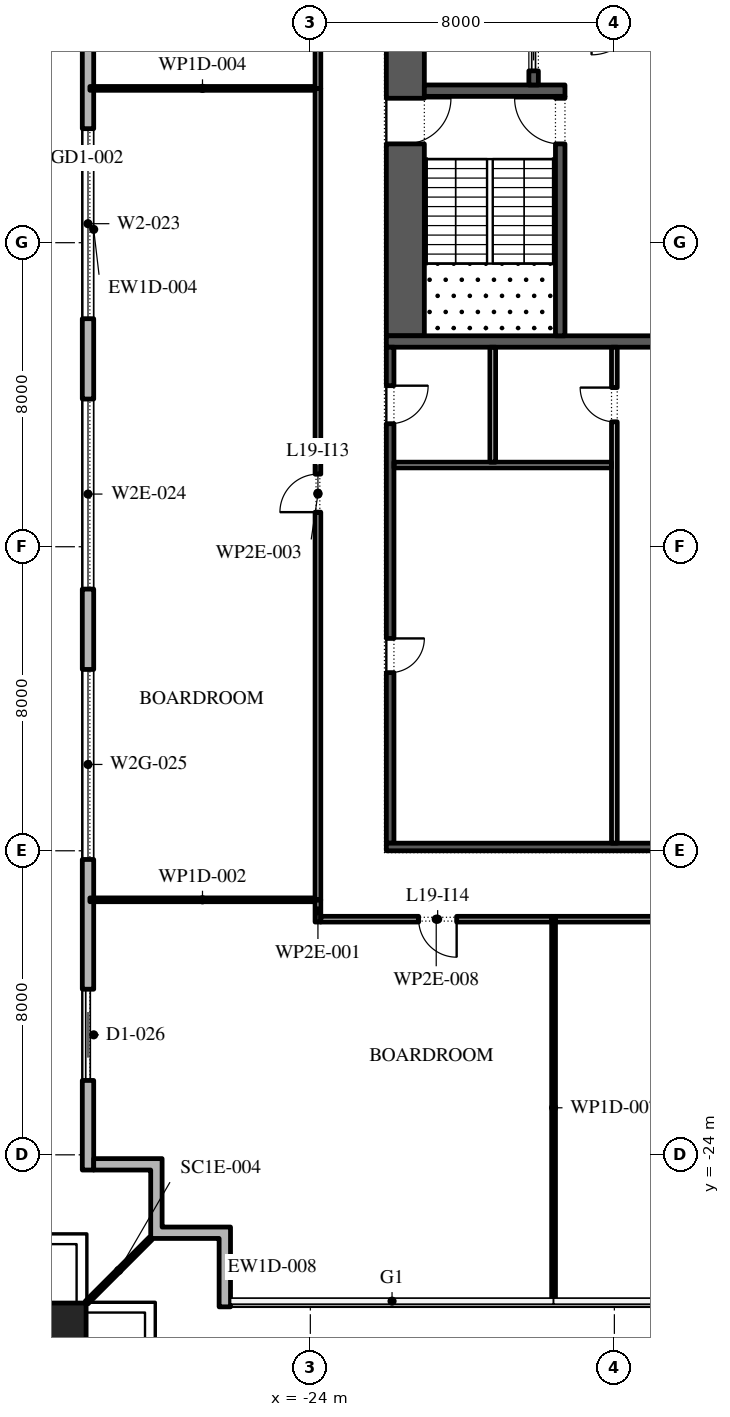
"""IFC4 building model, lengths in metres.
Left out: names, types, materials, properties, quantities, classifications, styles, units other than length and angle.
Written with IfcOpenShell. Run it as: python <this file> out.ifc"""

import sys

from ifc_helpers import new_model, si_unit, direction, frame, frame_2d, origin, origin_2d, place, context, subcontext, project, spatial, polyline, rectangle, outline, extrude, element, fill, save


model = new_model("IFC4")
c1 = context("Model", 3, precision=1e-05, world=origin(), true_north=direction((0.0, 1.0)))
c2 = subcontext(c1, "Body", "Model", "MODEL_VIEW")
j1 = project(units=[si_unit("LENGTHUNIT", "METRE"), si_unit("PLANEANGLEUNIT", "RADIAN")], contexts=[c1])
p1 = place(None, origin())
s1 = spatial("IfcSite", under=j1, at=p1, CompositionType="ELEMENT")
p2 = place(p1, origin())
s2 = spatial("IfcBuilding", under=s1, at=p2, CompositionType="ELEMENT")
p3 = place(p2, frame((0.0, 0.0, 90.0)))
s3 = spatial("IfcBuildingStorey", under=s2, at=p3, CompositionType="ELEMENT", Elevation=90.0)
p4 = place(p3, frame((-30.6, -28.6, 0.0), z_axis=(0.0, 0.0, 1.0), x_axis=(1.0, 0.0, 0.0)))
e1 = element("IfcColumn", 1, at=p4, inside=s3, PredefinedType="COLUMN", context=c2, shape_type="SweptSolid", body=[
    extrude(rectangle(XDim=1.4, YDim=1.4, at=origin_2d()), origin(), (0.0, 0.0, 1.0), 4.2),
])
p5 = place(p3, frame((-29.85, 25.1, 0.0), z_axis=(0.0, 0.0, 1.0), x_axis=(0.0, -1.0, 0.0)))
e2 = element("IfcWall", 2, at=p5, inside=s3, PredefinedType="STANDARD", context=c2, shape_type="SweptSolid", body=[
    extrude(rectangle(XDim=49.5, YDim=0.3, at=frame_2d((24.75, 0.0))), origin(), (0.0, 0.0, 1.0), 3.9),
])
p6 = place(p5, frame((0.907, 0.0, 0.45)))
e3 = element("IfcOpeningElement", 3, at=p6, cuts=e2, PredefinedType="OPENING", context=c2, shape_type="SweptSolid", body=[
    extrude(rectangle(XDim=5.0, YDim=2.775, at=frame_2d((2.5, 1.387))), frame((0.0, 0.16, 0.0), z_axis=(0.0, -1.0, 0.0), x_axis=(1.0, 0.0, 0.0)), (0.0, 0.0, 1.0), 0.32),
])
p7 = place(p5, frame((7.871, 0.0, 0.45)))
e4 = element("IfcOpeningElement", 4, at=p7, cuts=e2, PredefinedType="OPENING", context=c2, shape_type="SweptSolid", body=[
    extrude(rectangle(XDim=5.0, YDim=3.25, at=frame_2d((2.5, 1.625))), frame((0.0, 0.16, 0.0), z_axis=(0.0, -1.0, 0.0), x_axis=(1.0, 0.0, 0.0)), (0.0, 0.0, 1.0), 0.32),
])
p8 = place(p5, frame((16.286, 0.0, 0.0)))
e5 = element("IfcOpeningElement", 5, at=p8, cuts=e2, PredefinedType="OPENING", context=c2, shape_type="SweptSolid", body=[
    extrude(rectangle(XDim=2.4, YDim=3.5, at=frame_2d((1.2, 1.75))), frame((0.0, 0.16, 0.0), z_axis=(0.0, -1.0, 0.0), x_axis=(1.0, 0.0, 0.0)), (0.0, 0.0, 1.0), 0.32),
])
p9 = place(p5, frame((22.1, 0.0, 0.45)))
e6 = element("IfcOpeningElement", 6, at=p9, cuts=e2, PredefinedType="OPENING", context=c2, shape_type="SweptSolid", body=[
    extrude(rectangle(XDim=5.0, YDim=3.25, at=frame_2d((2.5, 1.625))), frame((0.0, 0.16, 0.0), z_axis=(0.0, -1.0, 0.0), x_axis=(1.0, 0.0, 0.0)), (0.0, 0.0, 1.0), 0.32),
])
p10 = place(p5, frame((29.214, 0.0, 0.45)))
e7 = element("IfcOpeningElement", 7, at=p10, cuts=e2, PredefinedType="OPENING", context=c2, shape_type="SweptSolid", body=[
    extrude(rectangle(XDim=5.0, YDim=2.775, at=frame_2d((2.5, 1.387))), frame((0.0, 0.16, 0.0), z_axis=(0.0, -1.0, 0.0), x_axis=(1.0, 0.0, 0.0)), (0.0, 0.0, 1.0), 0.32),
])
p11 = place(p5, frame((36.329, 0.0, 0.45)))
e8 = element("IfcOpeningElement", 8, at=p11, cuts=e2, PredefinedType="OPENING", context=c2, shape_type="SweptSolid", body=[
    extrude(rectangle(XDim=5.0, YDim=2.725, at=frame_2d((2.5, 1.363))), frame((0.0, 0.16, 0.0), z_axis=(0.0, -1.0, 0.0), x_axis=(1.0, 0.0, 0.0)), (0.0, 0.0, 1.0), 0.32),
])
p12 = place(p5, frame((44.743, 0.0, 0.0)))
e9 = element("IfcOpeningElement", 9, at=p12, cuts=e2, PredefinedType="OPENING", context=c2, shape_type="SweptSolid", body=[
    extrude(rectangle(XDim=2.4, YDim=3.5, at=frame_2d((1.2, 1.75))), frame((0.0, 0.16, 0.0), z_axis=(0.0, -1.0, 0.0), x_axis=(1.0, 0.0, 0.0)), (0.0, 0.0, 1.0), 0.32),
])
p13 = place(p3, origin())
e10 = element("IfcWall", 10, at=p13, inside=s3, PredefinedType="STANDARD", context=c2, shape_type="SweptSolid", body=[
    extrude(outline(polyline([(-26.4, -26.2), (-28.2, -26.2), (-28.2, -24.4), (-29.7, -24.4), (-29.7, -24.1), (-27.9, -24.1), (-27.9, -25.9), (-26.1, -25.9), (-26.1, -28.0), (-26.4, -28.0), (-26.4, -26.2)])), origin(), (0.0, 0.0, 1.0), 3.9),
])
p14 = place(p3, frame((-28.2, -26.2, -0.05), z_axis=(0.0, 0.0, 1.0), x_axis=(-0.707106781187, -0.707106781187, 0.0)))
e11 = element("IfcWall", 11, at=p14, inside=s3, PredefinedType="STANDARD", context=c2, shape_type="SweptSolid", body=[
    extrude(rectangle(XDim=2.385, YDim=0.1, at=frame_2d((1.192, 0.0))), origin(), (0.0, 0.0, 1.0), 3.95),
])
p15 = place(p3, frame((-21.5, -2.45, 0.0), z_axis=(0.0, 0.0, 1.0), x_axis=(0.0, 1.0, 0.0)))
e12 = element("IfcWall", 12, at=p15, inside=s3, PredefinedType="SHEAR", context=c2, shape_type="SweptSolid", body=[
    extrude(rectangle(XDim=27.9, YDim=1.0, at=frame_2d((13.95, 0.0))), origin(), (0.0, 0.0, 1.0), 3.9),
])
p16 = place(p15, frame((5.05, 0.0, 0.0)))
e13 = element("IfcOpeningElement", 13, at=p16, cuts=e12, PredefinedType="OPENING", context=c2, shape_type="SweptSolid", body=[
    extrude(rectangle(XDim=1.2, YDim=2.1, at=frame_2d((0.6, 1.05))), frame((0.0, 0.51, 0.0), z_axis=(0.0, -1.0, 0.0), x_axis=(1.0, 0.0, 0.0)), (0.0, 0.0, 1.0), 1.02),
])
p17 = place(p15, frame((21.65, 0.0, 0.0)))
e14 = element("IfcOpeningElement", 14, at=p17, cuts=e12, PredefinedType="OPENING", context=c2, shape_type="SweptSolid", body=[
    extrude(rectangle(XDim=1.2, YDim=2.1, at=frame_2d((0.6, 1.05))), frame((0.0, 0.51, 0.0), z_axis=(0.0, -1.0, 0.0), x_axis=(1.0, 0.0, 0.0)), (0.0, 0.0, 1.0), 1.02),
])
p18 = place(p3, frame((-22.0, -2.6, 0.0), z_axis=(0.0, 0.0, 1.0), x_axis=(1.0, 0.0, 0.0)))
e15 = element("IfcWall", 15, at=p18, inside=s3, PredefinedType="SHEAR", context=c2, shape_type="SweptSolid", body=[
    extrude(rectangle(XDim=12.0, YDim=0.3, at=frame_2d((6.0, 0.0))), origin(), (0.0, 0.0, 1.0), 3.9),
])
p19 = place(p3, frame((-21.0, 4.0, 0.0), z_axis=(0.0, 0.0, 1.0), x_axis=(1.0, 0.0, 0.0)))
e16 = element("IfcWall", 16, at=p19, inside=s3, PredefinedType="SHEAR", context=c2, shape_type="SweptSolid", body=[
    extrude(rectangle(XDim=3.7, YDim=0.3, at=frame_2d((1.85, 0.0))), origin(), (0.0, 0.0, 1.0), 3.9),
])
p20 = place(p3, frame((-17.425, -2.45, 0.0), z_axis=(0.0, 0.0, 1.0), x_axis=(0.0, 1.0, 0.0)))
e17 = element("IfcWall", 17, at=p20, inside=s3, PredefinedType="SHEAR", context=c2, shape_type="SweptSolid", body=[
    extrude(rectangle(XDim=6.3, YDim=0.25, at=frame_2d((3.15, 0.0))), origin(), (0.0, 0.0, 1.0), 3.9),
])
p21 = place(p20, frame((5.05, 0.0, 0.0)))
e18 = element("IfcOpeningElement", 18, at=p21, cuts=e17, PredefinedType="OPENING", context=c2, shape_type="SweptSolid", body=[
    extrude(rectangle(XDim=1.2, YDim=2.1, at=frame_2d((0.6, 1.05))), frame((0.0, 0.135, 0.0), z_axis=(0.0, -1.0, 0.0), x_axis=(1.0, 0.0, 0.0)), (0.0, 0.0, 1.0), 0.27),
])
p22 = place(p3, frame((-18.125, 4.15, 0.0), z_axis=(0.0, 0.0, 1.0), x_axis=(0.0, 1.0, 0.0)))
e19 = element("IfcWall", 19, at=p22, inside=s3, PredefinedType="SHEAR", context=c2, shape_type="SweptSolid", body=[
    extrude(rectangle(XDim=14.7, YDim=0.25, at=frame_2d((7.35, 0.0))), origin(), (0.0, 0.0, 1.0), 3.9),
])
p23 = place(p22, frame((0.371, 0.0, 0.0)))
e20 = element("IfcOpeningElement", 20, at=p23, cuts=e19, PredefinedType="OPENING", context=c2, shape_type="SweptSolid", body=[
    extrude(rectangle(XDim=1.1, YDim=2.1, at=frame_2d((0.55, 1.05))), frame((0.0, 0.135, 0.0), z_axis=(0.0, -1.0, 0.0), x_axis=(1.0, 0.0, 0.0)), (0.0, 0.0, 1.0), 0.27),
])
p24 = place(p22, frame((2.514, 0.0, 0.0)))
e21 = element("IfcOpeningElement", 21, at=p24, cuts=e19, PredefinedType="OPENING", context=c2, shape_type="SweptSolid", body=[
    extrude(rectangle(XDim=1.1, YDim=2.1, at=frame_2d((0.55, 1.05))), frame((0.0, 0.135, 0.0), z_axis=(0.0, -1.0, 0.0), x_axis=(1.0, 0.0, 0.0)), (0.0, 0.0, 1.0), 0.27),
])
p25 = place(p22, frame((4.657, 0.0, 0.0)))
e22 = element("IfcOpeningElement", 22, at=p25, cuts=e19, PredefinedType="OPENING", context=c2, shape_type="SweptSolid", body=[
    extrude(rectangle(XDim=1.1, YDim=2.1, at=frame_2d((0.55, 1.05))), frame((0.0, 0.135, 0.0), z_axis=(0.0, -1.0, 0.0), x_axis=(1.0, 0.0, 0.0)), (0.0, 0.0, 1.0), 0.27),
])
p26 = place(p22, frame((6.8, 0.0, 0.0)))
e23 = element("IfcOpeningElement", 23, at=p26, cuts=e19, PredefinedType="OPENING", context=c2, shape_type="SweptSolid", body=[
    extrude(rectangle(XDim=1.1, YDim=2.1, at=frame_2d((0.55, 1.05))), frame((0.0, 0.135, 0.0), z_axis=(0.0, -1.0, 0.0), x_axis=(1.0, 0.0, 0.0)), (0.0, 0.0, 1.0), 0.27),
])
p27 = place(p22, frame((8.943, 0.0, 0.0)))
e24 = element("IfcOpeningElement", 24, at=p27, cuts=e19, PredefinedType="OPENING", context=c2, shape_type="SweptSolid", body=[
    extrude(rectangle(XDim=1.1, YDim=2.1, at=frame_2d((0.55, 1.05))), frame((0.0, 0.135, 0.0), z_axis=(0.0, -1.0, 0.0), x_axis=(1.0, 0.0, 0.0)), (0.0, 0.0, 1.0), 0.27),
])
p28 = place(p22, frame((11.086, 0.0, 0.0)))
e25 = element("IfcOpeningElement", 25, at=p28, cuts=e19, PredefinedType="OPENING", context=c2, shape_type="SweptSolid", body=[
    extrude(rectangle(XDim=1.1, YDim=2.1, at=frame_2d((0.55, 1.05))), frame((0.0, 0.135, 0.0), z_axis=(0.0, -1.0, 0.0), x_axis=(1.0, 0.0, 0.0)), (0.0, 0.0, 1.0), 0.27),
])
p29 = place(p22, frame((13.229, 0.0, 0.0)))
e26 = element("IfcOpeningElement", 26, at=p29, cuts=e19, PredefinedType="OPENING", context=c2, shape_type="SweptSolid", body=[
    extrude(rectangle(XDim=1.1, YDim=2.1, at=frame_2d((0.55, 1.05))), frame((0.0, 0.135, 0.0), z_axis=(0.0, -1.0, 0.0), x_axis=(1.0, 0.0, 0.0)), (0.0, 0.0, 1.0), 0.27),
])
p30 = place(p3, frame((-21.9, -15.8, 0.0), z_axis=(0.0, 0.0, 1.0), x_axis=(0.0, 1.0, 0.0)))
e27 = element("IfcWall", 27, at=p30, inside=s3, PredefinedType="SHEAR", context=c2, shape_type="SweptSolid", body=[
    extrude(rectangle(XDim=13.05, YDim=0.2, at=frame_2d((6.525, 0.0))), origin(), (0.0, 0.0, 1.0), 3.9),
])
p31 = place(p30, frame((4.488, 0.0, 0.0)))
e28 = element("IfcOpeningElement", 28, at=p31, cuts=e27, PredefinedType="OPENING", context=c2, shape_type="SweptSolid", body=[
    extrude(rectangle(XDim=0.9, YDim=2.1, at=frame_2d((0.45, 1.05))), frame((0.0, 0.11, 0.0), z_axis=(0.0, -1.0, 0.0), x_axis=(1.0, 0.0, 0.0)), (0.0, 0.0, 1.0), 0.22),
])
p32 = place(p30, frame((11.038, 0.0, 0.0)))
e29 = element("IfcOpeningElement", 29, at=p32, cuts=e27, PredefinedType="OPENING", context=c2, shape_type="SweptSolid", body=[
    extrude(rectangle(XDim=1.0, YDim=2.1, at=frame_2d((0.5, 1.05))), frame((0.0, 0.11, 0.0), z_axis=(0.0, -1.0, 0.0), x_axis=(1.0, 0.0, 0.0)), (0.0, 0.0, 1.0), 0.22),
])
p33 = place(p3, frame((-22.0, -15.9, 0.0), z_axis=(0.0, 0.0, 1.0), x_axis=(1.0, 0.0, 0.0)))
e30 = element("IfcWall", 30, at=p33, inside=s3, PredefinedType="SHEAR", context=c2, shape_type="SweptSolid", body=[
    extrude(rectangle(XDim=12.0, YDim=0.2, at=frame_2d((6.0, 0.0))), origin(), (0.0, 0.0, 1.0), 3.9),
])
p34 = place(p3, frame((-16.0, -15.8, 0.0), z_axis=(0.0, 0.0, 1.0), x_axis=(0.0, 1.0, 0.0)))
e31 = element("IfcWall", 31, at=p34, inside=s3, PredefinedType="PARTITIONING", context=c2, shape_type="SweptSolid", body=[
    extrude(rectangle(XDim=13.05, YDim=0.15, at=frame_2d((6.525, 0.0))), origin(), (0.0, 0.0, 1.0), 3.9),
])
p35 = place(p34, frame((11.087, 0.0, 0.0)))
e32 = element("IfcOpeningElement", 32, at=p35, cuts=e31, PredefinedType="OPENING", context=c2, shape_type="SweptSolid", body=[
    extrude(rectangle(XDim=0.9, YDim=2.1, at=frame_2d((0.45, 1.05))), frame((0.0, 0.085, 0.0), z_axis=(0.0, -1.0, 0.0), x_axis=(1.0, 0.0, 0.0)), (0.0, 0.0, 1.0), 0.17),
])
p36 = place(p3, frame((-21.8, -5.85, 0.0), z_axis=(0.0, 0.0, 1.0), x_axis=(1.0, 0.0, 0.0)))
e33 = element("IfcWall", 33, at=p36, inside=s3, PredefinedType="PARTITIONING", context=c2, shape_type="SweptSolid", body=[
    extrude(rectangle(XDim=5.725, YDim=0.15, at=frame_2d((2.863, 0.0))), origin(), (0.0, 0.0, 1.0), 3.9),
])
p37 = place(p3, frame((-19.2, -5.775, 0.0), z_axis=(0.0, 0.0, 1.0), x_axis=(0.0, 1.0, 0.0)))
e34 = element("IfcWall", 34, at=p37, inside=s3, PredefinedType="PARTITIONING", context=c2, shape_type="SweptSolid", body=[
    extrude(rectangle(XDim=3.025, YDim=0.15, at=frame_2d((1.512, 0.0))), origin(), (0.0, 0.0, 1.0), 3.9),
])
p38 = place(p3, frame((-23.8, -17.875, 0.0), z_axis=(0.0, 0.0, 1.0), x_axis=(0.0, 1.0, 0.0)))
e35 = element("IfcWall", 35, at=p38, inside=s3, PredefinedType="PARTITIONING", context=c2, shape_type="SweptSolid", body=[
    extrude(rectangle(XDim=0.585, YDim=0.15, at=frame_2d((0.292, 0.0))), origin(), (0.0, 0.0, 1.0), 3.9),
])
p39 = place(p3, frame((-23.875, -17.29, 0.0), z_axis=(0.0, 0.0, 1.0), x_axis=(-1.0, 0.0, 0.0)))
e36 = element("IfcWall", 36, at=p39, inside=s3, PredefinedType="PARTITIONING", context=c2, shape_type="SweptSolid", body=[
    extrude(rectangle(XDim=5.925, YDim=0.1, at=frame_2d((2.962, 0.0))), origin(), (0.0, 0.0, 1.0), 3.9),
])
p40 = place(p3, frame((-23.8, -17.29, 0.0), z_axis=(0.0, 0.0, 1.0), x_axis=(0.0, 1.0, 0.0)))
e37 = element("IfcWall", 37, at=p40, inside=s3, PredefinedType="PARTITIONING", context=c2, shape_type="SweptSolid", body=[
    extrude(rectangle(XDim=21.35, YDim=0.15, at=frame_2d((10.675, 0.0))), origin(), (0.0, 0.0, 1.0), 3.9),
])
p41 = place(p40, frame((10.2, 0.0, 0.0)))
e38 = element("IfcOpeningElement", 38, at=p41, cuts=e37, PredefinedType="OPENING", context=c2, shape_type="SweptSolid", body=[
    extrude(rectangle(XDim=1.0, YDim=2.1, at=frame_2d((0.5, 1.05))), frame((0.0, 0.085, 0.0), z_axis=(0.0, -1.0, 0.0), x_axis=(1.0, 0.0, 0.0)), (0.0, 0.0, 1.0), 0.17),
])
p42 = place(p3, frame((-23.875, 4.06, 0.0), z_axis=(0.0, 0.0, 1.0), x_axis=(-1.0, 0.0, 0.0)))
e39 = element("IfcWall", 39, at=p42, inside=s3, PredefinedType="PARTITIONING", context=c2, shape_type="SweptSolid", body=[
    extrude(rectangle(XDim=5.925, YDim=0.1, at=frame_2d((2.962, 0.0))), origin(), (0.0, 0.0, 1.0), 3.9),
])
p43 = place(p3, frame((-23.8, 4.06, 0.0), z_axis=(0.0, 0.0, 1.0), x_axis=(0.0, 1.0, 0.0)))
e40 = element("IfcWall", 40, at=p43, inside=s3, PredefinedType="PARTITIONING", context=c2, shape_type="SweptSolid", body=[
    extrude(rectangle(XDim=23.14, YDim=0.15, at=frame_2d((11.57, 0.0))), origin(), (0.0, 0.0, 1.0), 3.9),
])
p44 = place(p43, frame((10.99, 0.0, 0.0)))
e41 = element("IfcOpeningElement", 41, at=p44, cuts=e40, PredefinedType="OPENING", context=c2, shape_type="SweptSolid", body=[
    extrude(rectangle(XDim=1.0, YDim=2.1, at=frame_2d((0.5, 1.05))), frame((0.0, 0.085, 0.0), z_axis=(0.0, -1.0, 0.0), x_axis=(1.0, 0.0, 0.0)), (0.0, 0.0, 1.0), 0.17),
])
p45 = place(p3, frame((-17.6, -27.8, 0.0), z_axis=(0.0, 0.0, 1.0), x_axis=(0.0, 1.0, 0.0)))
e42 = element("IfcWall", 42, at=p45, inside=s3, PredefinedType="PARTITIONING", context=c2, shape_type="SweptSolid", body=[
    extrude(rectangle(XDim=10.075, YDim=0.1, at=frame_2d((5.038, 0.0))), origin(), (0.0, 0.0, 1.0), 3.9),
])
p46 = place(p3, frame((-17.65, -17.8, 0.0), z_axis=(0.0, 0.0, 1.0), x_axis=(-1.0, 0.0, 0.0)))
e43 = element("IfcWall", 43, at=p46, inside=s3, PredefinedType="PARTITIONING", context=c2, shape_type="SweptSolid", body=[
    extrude(rectangle(XDim=6.075, YDim=0.15, at=frame_2d((3.038, 0.0))), origin(), (0.0, 0.0, 1.0), 3.9),
])
p47 = place(p46, frame((2.5, 0.0, 0.0)))
e44 = element("IfcOpeningElement", 44, at=p47, cuts=e43, PredefinedType="OPENING", context=c2, shape_type="SweptSolid", body=[
    extrude(rectangle(XDim=1.0, YDim=2.1, at=frame_2d((0.5, 1.05))), frame((0.0, 0.085, 0.0), z_axis=(0.0, -1.0, 0.0), x_axis=(1.0, 0.0, 0.0)), (0.0, 0.0, 1.0), 0.17),
])
p48 = place(p3, frame((-8.85, -17.8, 0.0), z_axis=(0.0, 0.0, 1.0), x_axis=(-1.0, 0.0, 0.0)))
e45 = element("IfcWall", 45, at=p48, inside=s3, PredefinedType="PARTITIONING", context=c2, shape_type="SweptSolid", body=[
    extrude(rectangle(XDim=8.7, YDim=0.15, at=frame_2d((4.35, 0.0))), origin(), (0.0, 0.0, 1.0), 3.9),
])
p49 = place(p48, frame((2.85, 0.0, 0.0)))
e46 = element("IfcOpeningElement", 46, at=p49, cuts=e45, PredefinedType="OPENING", context=c2, shape_type="SweptSolid", body=[
    extrude(rectangle(XDim=1.0, YDim=2.1, at=frame_2d((0.5, 1.05))), frame((0.0, 0.085, 0.0), z_axis=(0.0, -1.0, 0.0), x_axis=(1.0, 0.0, 0.0)), (0.0, 0.0, 1.0), 0.17),
])
p50 = place(p9, origin())
e47 = element("IfcWindow", 47, at=p50, inside=s3, PartitioningType="DOUBLE_PANEL_VERTICAL", PredefinedType="WINDOW", context=c2, shape_type="SweptSolid", body=[
    extrude(rectangle(XDim=5.0, YDim=3.25, at=frame_2d((2.5, 1.625))), frame((0.0, 0.03, 0.0), z_axis=(0.0, -1.0, 0.0), x_axis=(1.0, 0.0, 0.0)), (0.0, 0.0, 1.0), 0.06),
])
fill(e6, e47)
p51 = place(p10, origin())
e48 = element("IfcWindow", 48, at=p51, inside=s3, PartitioningType="DOUBLE_PANEL_VERTICAL", PredefinedType="WINDOW", context=c2, shape_type="SweptSolid", body=[
    extrude(rectangle(XDim=5.0, YDim=2.775, at=frame_2d((2.5, 1.387))), frame((0.0, 0.03, 0.0), z_axis=(0.0, -1.0, 0.0), x_axis=(1.0, 0.0, 0.0)), (0.0, 0.0, 1.0), 0.06),
])
fill(e7, e48)
p52 = place(p11, origin())
e49 = element("IfcWindow", 49, at=p52, inside=s3, PartitioningType="DOUBLE_PANEL_VERTICAL", PredefinedType="WINDOW", context=c2, shape_type="SweptSolid", body=[
    extrude(rectangle(XDim=5.0, YDim=2.725, at=frame_2d((2.5, 1.363))), frame((0.0, 0.03, 0.0), z_axis=(0.0, -1.0, 0.0), x_axis=(1.0, 0.0, 0.0)), (0.0, 0.0, 1.0), 0.06),
])
fill(e8, e49)
p53 = place(p12, origin())
e50 = element("IfcDoor", 50, at=p53, inside=s3, OperationType="DOUBLE_DOOR_SLIDING", PredefinedType="DOOR", context=c2, shape_type="SweptSolid", body=[
    extrude(rectangle(XDim=2.4, YDim=3.5, at=frame_2d((1.2, 1.75))), frame((0.0, 0.025, 0.0), z_axis=(0.0, -1.0, 0.0), x_axis=(1.0, 0.0, 0.0)), (0.0, 0.0, 1.0), 0.05),
])
fill(e9, e50)
p54 = place(p23, origin())
e51 = element("IfcDoor", 51, at=p54, inside=s3, OperationType="SLIDING_TO_LEFT", PredefinedType="DOOR", context=c2, shape_type="SweptSolid", body=[
    extrude(rectangle(XDim=1.1, YDim=2.1, at=frame_2d((0.55, 1.05))), frame((0.0, 0.025, 0.0), z_axis=(0.0, -1.0, 0.0), x_axis=(1.0, 0.0, 0.0)), (0.0, 0.0, 1.0), 0.05),
])
fill(e20, e51)
p55 = place(p21, origin())
e52 = element("IfcDoor", 52, at=p55, inside=s3, OperationType="SINGLE_SWING_LEFT", PredefinedType="DOOR", context=c2, shape_type="SweptSolid", body=[
    extrude(rectangle(XDim=1.2, YDim=2.1, at=frame_2d((0.6, 1.05))), frame((0.0, 0.025, 0.0), z_axis=(0.0, -1.0, 0.0), x_axis=(1.0, 0.0, 0.0)), (0.0, 0.0, 1.0), 0.05),
])
fill(e18, e52)
p56 = place(p16, frame((1.2, 0.0, 0.0), z_axis=(0.0, 0.0, 1.0), x_axis=(-1.0, 0.0, 0.0)))
e53 = element("IfcDoor", 53, at=p56, inside=s3, OperationType="SINGLE_SWING_RIGHT", PredefinedType="DOOR", context=c2, shape_type="SweptSolid", body=[
    extrude(rectangle(XDim=1.2, YDim=2.1, at=frame_2d((0.6, 1.05))), frame((0.0, 0.025, 0.0), z_axis=(0.0, -1.0, 0.0), x_axis=(1.0, 0.0, 0.0)), (0.0, 0.0, 1.0), 0.05),
])
fill(e13, e53)
p57 = place(p31, frame((0.9, -0.15, 0.0), z_axis=(0.0, 0.0, 1.0), x_axis=(-1.0, 0.0, 0.0)))
e54 = element("IfcDoor", 54, at=p57, inside=s3, OperationType="SINGLE_SWING_RIGHT", PredefinedType="DOOR", context=c2, shape_type="SweptSolid", body=[
    extrude(rectangle(XDim=0.9, YDim=2.1, at=frame_2d((0.45, 1.05))), frame((0.0, -0.05, 0.0), z_axis=(0.0, -1.0, 0.0), x_axis=(1.0, 0.0, 0.0)), (0.0, 0.0, 1.0), 0.05),
])
fill(e28, e54)
p58 = place(p32, frame((1.0, -0.15, 0.0), z_axis=(0.0, 0.0, 1.0), x_axis=(-1.0, 0.0, 0.0)))
e55 = element("IfcDoor", 55, at=p58, inside=s3, OperationType="SINGLE_SWING_RIGHT", PredefinedType="DOOR", context=c2, shape_type="SweptSolid", body=[
    extrude(rectangle(XDim=1.0, YDim=2.1, at=frame_2d((0.5, 1.05))), frame((0.0, -0.05, 0.0), z_axis=(0.0, -1.0, 0.0), x_axis=(1.0, 0.0, 0.0)), (0.0, 0.0, 1.0), 0.05),
])
fill(e29, e55)
p59 = place(p35, origin())
e56 = element("IfcDoor", 56, at=p59, inside=s3, OperationType="SINGLE_SWING_LEFT", PredefinedType="DOOR", context=c2, shape_type="SweptSolid", body=[
    extrude(rectangle(XDim=0.9, YDim=2.1, at=frame_2d((0.45, 1.05))), frame((0.0, 0.025, 0.0), z_axis=(0.0, -1.0, 0.0), x_axis=(1.0, 0.0, 0.0)), (0.0, 0.0, 1.0), 0.05),
])
fill(e32, e56)
p60 = place(p41, origin())
e57 = element("IfcDoor", 57, at=p60, inside=s3, OperationType="SINGLE_SWING_RIGHT", PredefinedType="DOOR", context=c2, shape_type="SweptSolid", body=[
    extrude(rectangle(XDim=1.0, YDim=2.1, at=frame_2d((0.5, 1.05))), frame((0.0, 0.025, 0.0), z_axis=(0.0, -1.0, 0.0), x_axis=(1.0, 0.0, 0.0)), (0.0, 0.0, 1.0), 0.05),
])
fill(e38, e57)
p61 = place(p47, origin())
e58 = element("IfcDoor", 58, at=p61, inside=s3, OperationType="SINGLE_SWING_RIGHT", PredefinedType="DOOR", context=c2, shape_type="SweptSolid", body=[
    extrude(rectangle(XDim=1.0, YDim=2.1, at=frame_2d((0.5, 1.05))), frame((0.0, 0.025, 0.0), z_axis=(0.0, -1.0, 0.0), x_axis=(1.0, 0.0, 0.0)), (0.0, 0.0, 1.0), 0.05),
])
fill(e44, e58)
save(model, sys.argv[1])
